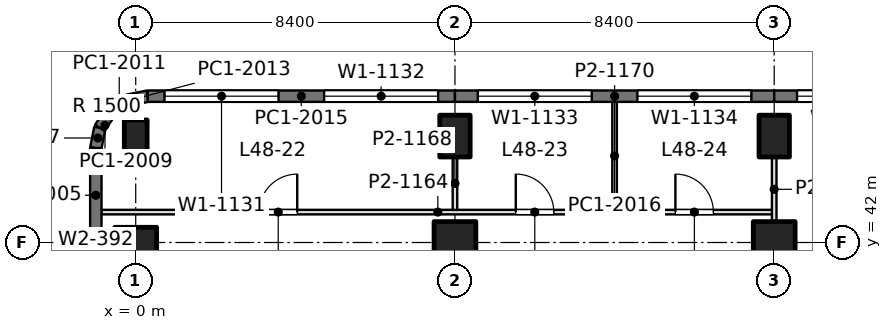
"""IFC4 building model, lengths in metres.
Left out: names, types, materials, properties, quantities, classifications, styles, units other than length and angle.
Written with IfcOpenShell. Run it as: python <this file> out.ifc"""

import sys

from ifc_helpers import new_model, si_unit, direction, frame, frame_2d, origin, origin_2d, place, context, subcontext, project, spatial, rectangle, extrude, element, fill, save


model = new_model("IFC4")
c1 = context("Model", 3, precision=1e-05, world=origin(), true_north=direction((0.0, 1.0)))
c2 = subcontext(c1, "Body", "Model", "MODEL_VIEW")
j1 = project(units=[si_unit("LENGTHUNIT", "METRE"), si_unit("PLANEANGLEUNIT", "RADIAN")], contexts=[c1])
p1 = place(None, origin())
s1 = spatial("IfcSite", under=j1, at=p1, CompositionType="ELEMENT")
p2 = place(p1, origin())
s2 = spatial("IfcBuilding", under=s1, at=p2, CompositionType="ELEMENT")
p3 = place(p2, frame((0.0, 0.0, 211.2)))
s3 = spatial("IfcBuildingStorey", under=s2, at=p3, CompositionType="ELEMENT", Elevation=211.2)
p4 = place(p3, frame((0.0, 42.0, 0.0), z_axis=(0.0, 0.0, 1.0), x_axis=(0.0, 1.0, 0.0)))
e1 = element("IfcColumn", 1, at=p4, inside=s3, PredefinedType="COLUMN", context=c2, shape_type="SweptSolid", body=[
    extrude(rectangle(XDim=0.8, YDim=1.1, at=origin_2d()), origin(), (0.0, 0.0, 1.0), 4.2),
])
p5 = place(p3, frame((0.0, 44.8, 0.0), z_axis=(0.0, 0.0, 1.0), x_axis=(1.0, 0.0, 0.0)))
e2 = element("IfcColumn", 2, at=p5, inside=s3, PredefinedType="COLUMN", context=c2, shape_type="SweptSolid", body=[
    extrude(rectangle(XDim=0.6, YDim=0.85, at=origin_2d()), origin(), (0.0, 0.0, 1.0), 4.2),
])
p6 = place(p3, frame((8.4, 42.0, 0.0), z_axis=(0.0, 0.0, 1.0), x_axis=(1.0, 0.0, 0.0)))
e3 = element("IfcColumn", 3, at=p6, inside=s3, PredefinedType="COLUMN", context=c2, shape_type="SweptSolid", body=[
    extrude(rectangle(XDim=1.1, YDim=1.1, at=origin_2d()), origin(), (0.0, 0.0, 1.0), 4.2),
])
p7 = place(p3, frame((8.4, 44.8, 0.0), z_axis=(0.0, 0.0, 1.0), x_axis=(1.0, 0.0, 0.0)))
e4 = element("IfcColumn", 4, at=p7, inside=s3, PredefinedType="COLUMN", context=c2, shape_type="SweptSolid", body=[
    extrude(rectangle(XDim=0.8, YDim=1.1, at=origin_2d()), origin(), (0.0, 0.0, 1.0), 4.2),
])
p8 = place(p3, frame((16.8, 42.0, 0.0), z_axis=(0.0, 0.0, 1.0), x_axis=(1.0, 0.0, 0.0)))
e5 = element("IfcColumn", 5, at=p8, inside=s3, PredefinedType="COLUMN", context=c2, shape_type="SweptSolid", body=[
    extrude(rectangle(XDim=1.1, YDim=1.1, at=origin_2d()), origin(), (0.0, 0.0, 1.0), 4.2),
])
p9 = place(p3, frame((16.8, 44.8, 0.0), z_axis=(0.0, 0.0, 1.0), x_axis=(1.0, 0.0, 0.0)))
e6 = element("IfcColumn", 6, at=p9, inside=s3, PredefinedType="COLUMN", context=c2, shape_type="SweptSolid", body=[
    extrude(rectangle(XDim=0.8, YDim=1.1, at=origin_2d()), origin(), (0.0, 0.0, 1.0), 4.2),
])
p10 = place(p3, frame((-1.05, 37.725, 0.0), z_axis=(0.0, 0.0, 1.0), x_axis=(0.0, 1.0, 0.0)))
e7 = element("IfcWall", 7, at=p10, inside=s3, PredefinedType="SOLIDWALL", context=c2, shape_type="SweptSolid", body=[
    extrude(rectangle(XDim=4.275, YDim=0.3, at=frame_2d((2.137, 0.0))), origin(), (0.0, 0.0, 1.0), 4.05),
])
p11 = place(p10, frame((0.938, 0.0, 0.9)))
e8 = element("IfcOpeningElement", 8, at=p11, cuts=e7, PredefinedType="OPENING", context=c2, shape_type="SweptSolid", body=[
    extrude(rectangle(XDim=2.4, YDim=1.9, at=frame_2d((1.2, 0.95))), frame((0.0, 0.16, 0.0), z_axis=(0.0, -1.0, 0.0), x_axis=(1.0, 0.0, 0.0)), (0.0, 0.0, 1.0), 0.32),
])
p12 = place(p3, frame((-1.05, 42.0, 0.0), z_axis=(0.0, 0.0, 1.0), x_axis=(0.0, 1.0, 0.0)))
e9 = element("IfcWall", 9, at=p12, inside=s3, PredefinedType="SOLIDWALL", context=c2, shape_type="SweptSolid", body=[
    extrude(rectangle(XDim=2.485, YDim=0.3, at=frame_2d((1.243, 0.0))), origin(), (0.0, 0.0, 1.0), 4.05),
])
p13 = place(p3, frame((-1.05, 44.485, 0.0), z_axis=(0.0, 0.0, 1.0), x_axis=(0.195073962632, 0.980788534345, 0.0)))
e10 = element("IfcWall", 10, at=p13, inside=s3, PredefinedType="SOLIDWALL", context=c2, shape_type="SweptSolid", body=[
    extrude(rectangle(XDim=0.541, YDim=0.3, at=frame_2d((0.271, 0.0))), origin(), (0.0, 0.0, 1.0), 4.05),
])
p14 = place(p3, frame((-0.945, 45.015, 0.0), z_axis=(0.0, 0.0, 1.0), x_axis=(0.55534295404, 0.831621430339, 0.0)))
e11 = element("IfcWall", 11, at=p14, inside=s3, PredefinedType="SOLIDWALL", context=c2, shape_type="SweptSolid", body=[
    extrude(rectangle(XDim=0.526, YDim=0.3, at=frame_2d((0.263, 0.0))), origin(), (0.0, 0.0, 1.0), 4.05),
])
p15 = place(p3, frame((-0.653, 45.453, 0.0), z_axis=(0.0, 0.0, 1.0), x_axis=(0.831692711774, 0.555236195849, 0.0)))
e12 = element("IfcWall", 12, at=p15, inside=s3, PredefinedType="SOLIDWALL", context=c2, shape_type="SweptSolid", body=[
    extrude(rectangle(XDim=0.525, YDim=0.3, at=frame_2d((0.263, 0.0))), origin(), (0.0, 0.0, 1.0), 4.05),
])
p16 = place(p3, frame((-0.216, 45.744, 0.0), z_axis=(0.0, 0.0, 1.0), x_axis=(0.980702050465, 0.1955082817, 0.0)))
e13 = element("IfcWall", 13, at=p16, inside=s3, PredefinedType="SOLIDWALL", context=c2, shape_type="SweptSolid", body=[
    extrude(rectangle(XDim=0.541, YDim=0.3, at=frame_2d((0.271, 0.0))), origin(), (0.0, 0.0, 1.0), 4.05),
])
p17 = place(p3, frame((0.315, 45.85, 0.0), z_axis=(0.0, 0.0, 1.0), x_axis=(1.0, 0.0, 0.0)))
e14 = element("IfcWall", 14, at=p17, inside=s3, PredefinedType="SOLIDWALL", context=c2, shape_type="SweptSolid", body=[
    extrude(rectangle(XDim=8.085, YDim=0.3, at=frame_2d((4.042, 0.0))), origin(), (0.0, 0.0, 1.0), 4.05),
])
p18 = place(p17, frame((0.443, 0.0, 0.9)))
e15 = element("IfcOpeningElement", 15, at=p18, cuts=e14, PredefinedType="OPENING", context=c2, shape_type="SweptSolid", body=[
    extrude(rectangle(XDim=3.0, YDim=1.9, at=frame_2d((1.5, 0.95))), frame((0.0, 0.16, 0.0), z_axis=(0.0, -1.0, 0.0), x_axis=(1.0, 0.0, 0.0)), (0.0, 0.0, 1.0), 0.32),
])
p19 = place(p17, frame((4.643, 0.0, 0.9)))
e16 = element("IfcOpeningElement", 16, at=p19, cuts=e14, PredefinedType="OPENING", context=c2, shape_type="SweptSolid", body=[
    extrude(rectangle(XDim=3.0, YDim=1.9, at=frame_2d((1.5, 0.95))), frame((0.0, 0.16, 0.0), z_axis=(0.0, -1.0, 0.0), x_axis=(1.0, 0.0, 0.0)), (0.0, 0.0, 1.0), 0.32),
])
p20 = place(p3, frame((8.4, 45.85, 0.0), z_axis=(0.0, 0.0, 1.0), x_axis=(1.0, 0.0, 0.0)))
e17 = element("IfcWall", 17, at=p20, inside=s3, PredefinedType="SOLIDWALL", context=c2, shape_type="SweptSolid", body=[
    extrude(rectangle(XDim=8.4, YDim=0.3, at=frame_2d((4.2, 0.0))), origin(), (0.0, 0.0, 1.0), 4.05),
])
p21 = place(p20, frame((0.6, 0.0, 0.9)))
e18 = element("IfcOpeningElement", 18, at=p21, cuts=e17, PredefinedType="OPENING", context=c2, shape_type="SweptSolid", body=[
    extrude(rectangle(XDim=3.0, YDim=1.9, at=frame_2d((1.5, 0.95))), frame((0.0, 0.16, 0.0), z_axis=(0.0, -1.0, 0.0), x_axis=(1.0, 0.0, 0.0)), (0.0, 0.0, 1.0), 0.32),
])
p22 = place(p20, frame((4.8, 0.0, 0.9)))
e19 = element("IfcOpeningElement", 19, at=p22, cuts=e17, PredefinedType="OPENING", context=c2, shape_type="SweptSolid", body=[
    extrude(rectangle(XDim=3.0, YDim=1.9, at=frame_2d((1.5, 0.95))), frame((0.0, 0.16, 0.0), z_axis=(0.0, -1.0, 0.0), x_axis=(1.0, 0.0, 0.0)), (0.0, 0.0, 1.0), 0.32),
])
p23 = place(p3, frame((16.8, 45.85, 0.0), z_axis=(0.0, 0.0, 1.0), x_axis=(1.0, 0.0, 0.0)))
e20 = element("IfcWall", 20, at=p23, inside=s3, PredefinedType="SOLIDWALL", context=c2, shape_type="SweptSolid", body=[
    extrude(rectangle(XDim=8.4, YDim=0.3, at=frame_2d((4.2, 0.0))), origin(), (0.0, 0.0, 1.0), 4.05),
])
p24 = place(p23, frame((0.6, 0.0, 0.9)))
e21 = element("IfcOpeningElement", 21, at=p24, cuts=e20, PredefinedType="OPENING", context=c2, shape_type="SweptSolid", body=[
    extrude(rectangle(XDim=3.0, YDim=1.9, at=frame_2d((1.5, 0.95))), frame((0.0, 0.16, 0.0), z_axis=(0.0, -1.0, 0.0), x_axis=(1.0, 0.0, 0.0)), (0.0, 0.0, 1.0), 0.32),
])
p25 = place(p23, frame((4.8, 0.0, 0.9)))
e22 = element("IfcOpeningElement", 22, at=p25, cuts=e20, PredefinedType="OPENING", context=c2, shape_type="SweptSolid", body=[
    extrude(rectangle(XDim=3.0, YDim=1.9, at=frame_2d((1.5, 0.95))), frame((0.0, 0.16, 0.0), z_axis=(0.0, -1.0, 0.0), x_axis=(1.0, 0.0, 0.0)), (0.0, 0.0, 1.0), 0.32),
])
p26 = place(p3, frame((-0.902, 42.8, 0.0), z_axis=(0.0, 0.0, 1.0), x_axis=(1.0, 0.0, 0.0)))
e23 = element("IfcWall", 23, at=p26, inside=s3, PredefinedType="PARTITIONING", context=c2, shape_type="SweptSolid", body=[
    extrude(rectangle(XDim=17.702, YDim=0.12, at=frame_2d((8.851, 0.0))), origin(), (0.0, 0.0, 1.0), 3.56),
])
p27 = place(p26, frame((4.152, 0.0, 0.0)))
e24 = element("IfcOpeningElement", 24, at=p27, cuts=e23, PredefinedType="OPENING", context=c2, shape_type="SweptSolid", body=[
    extrude(rectangle(XDim=1.0, YDim=2.4, at=frame_2d((0.5, 1.2))), frame((0.0, 0.07, 0.0), z_axis=(0.0, -1.0, 0.0), x_axis=(1.0, 0.0, 0.0)), (0.0, 0.0, 1.0), 0.14),
])
p28 = place(p26, frame((10.902, 0.0, 0.0)))
e25 = element("IfcOpeningElement", 25, at=p28, cuts=e23, PredefinedType="OPENING", context=c2, shape_type="SweptSolid", body=[
    extrude(rectangle(XDim=1.0, YDim=2.4, at=frame_2d((0.5, 1.2))), frame((0.0, 0.07, 0.0), z_axis=(0.0, -1.0, 0.0), x_axis=(1.0, 0.0, 0.0)), (0.0, 0.0, 1.0), 0.14),
])
p29 = place(p26, frame((15.102, 0.0, 0.0)))
e26 = element("IfcOpeningElement", 26, at=p29, cuts=e23, PredefinedType="OPENING", context=c2, shape_type="SweptSolid", body=[
    extrude(rectangle(XDim=1.0, YDim=2.4, at=frame_2d((0.5, 1.2))), frame((0.0, 0.07, 0.0), z_axis=(0.0, -1.0, 0.0), x_axis=(1.0, 0.0, 0.0)), (0.0, 0.0, 1.0), 0.14),
])
p30 = place(p3, frame((8.4, 42.858, 0.0), z_axis=(0.0, 0.0, 1.0), x_axis=(0.0, 1.0, 0.0)))
e27 = element("IfcWall", 27, at=p30, inside=s3, PredefinedType="PARTITIONING", context=c2, shape_type="SweptSolid", body=[
    extrude(rectangle(XDim=1.393, YDim=0.12, at=frame_2d((0.697, 0.0))), origin(), (0.0, 0.0, 1.0), 3.69),
])
p31 = place(p3, frame((12.6, 42.858, 0.0), z_axis=(0.0, 0.0, 1.0), x_axis=(0.0, 1.0, 0.0)))
e28 = element("IfcWall", 28, at=p31, inside=s3, PredefinedType="PARTITIONING", context=c2, shape_type="SweptSolid", body=[
    extrude(rectangle(XDim=2.844, YDim=0.12, at=frame_2d((1.422, 0.0))), origin(), (0.0, 0.0, 1.0), 3.56),
])
p32 = place(p3, frame((16.8, 42.548, 0.0), z_axis=(0.0, 0.0, 1.0), x_axis=(0.0, 1.0, 0.0)))
e29 = element("IfcWall", 29, at=p32, inside=s3, PredefinedType="PARTITIONING", context=c2, shape_type="SweptSolid", body=[
    extrude(rectangle(XDim=1.703, YDim=0.12, at=frame_2d((0.852, 0.0))), origin(), (0.0, 0.0, 1.0), 3.69),
])
p33 = place(p18, origin())
e30 = element("IfcWindow", 30, at=p33, inside=s3, PartitioningType="SINGLE_PANEL", PredefinedType="WINDOW", context=c2, shape_type="SweptSolid", body=[
    extrude(rectangle(XDim=3.0, YDim=1.9, at=frame_2d((1.5, 0.95))), frame((0.0, 0.03, 0.0), z_axis=(0.0, -1.0, 0.0), x_axis=(1.0, 0.0, 0.0)), (0.0, 0.0, 1.0), 0.06),
])
fill(e15, e30)
p34 = place(p19, origin())
e31 = element("IfcWindow", 31, at=p34, inside=s3, PartitioningType="SINGLE_PANEL", PredefinedType="WINDOW", context=c2, shape_type="SweptSolid", body=[
    extrude(rectangle(XDim=3.0, YDim=1.9, at=frame_2d((1.5, 0.95))), frame((0.0, 0.03, 0.0), z_axis=(0.0, -1.0, 0.0), x_axis=(1.0, 0.0, 0.0)), (0.0, 0.0, 1.0), 0.06),
])
fill(e16, e31)
p35 = place(p21, origin())
e32 = element("IfcWindow", 32, at=p35, inside=s3, PartitioningType="SINGLE_PANEL", PredefinedType="WINDOW", context=c2, shape_type="SweptSolid", body=[
    extrude(rectangle(XDim=3.0, YDim=1.9, at=frame_2d((1.5, 0.95))), frame((0.0, 0.03, 0.0), z_axis=(0.0, -1.0, 0.0), x_axis=(1.0, 0.0, 0.0)), (0.0, 0.0, 1.0), 0.06),
])
fill(e18, e32)
p36 = place(p22, origin())
e33 = element("IfcWindow", 33, at=p36, inside=s3, PartitioningType="SINGLE_PANEL", PredefinedType="WINDOW", context=c2, shape_type="SweptSolid", body=[
    extrude(rectangle(XDim=3.0, YDim=1.9, at=frame_2d((1.5, 0.95))), frame((0.0, 0.03, 0.0), z_axis=(0.0, -1.0, 0.0), x_axis=(1.0, 0.0, 0.0)), (0.0, 0.0, 1.0), 0.06),
])
fill(e19, e33)
p37 = place(p24, origin())
e34 = element("IfcWindow", 34, at=p37, inside=s3, PartitioningType="SINGLE_PANEL", PredefinedType="WINDOW", context=c2, shape_type="SweptSolid", body=[
    extrude(rectangle(XDim=3.0, YDim=1.9, at=frame_2d((1.5, 0.95))), frame((0.0, 0.03, 0.0), z_axis=(0.0, -1.0, 0.0), x_axis=(1.0, 0.0, 0.0)), (0.0, 0.0, 1.0), 0.06),
])
fill(e21, e34)
p38 = place(p27, origin())
e35 = element("IfcDoor", 35, at=p38, inside=s3, OperationType="SINGLE_SWING_RIGHT", PredefinedType="DOOR", context=c2, shape_type="SweptSolid", body=[
    extrude(rectangle(XDim=1.0, YDim=2.4, at=frame_2d((0.5, 1.2))), frame((0.0, 0.025, 0.0), z_axis=(0.0, -1.0, 0.0), x_axis=(1.0, 0.0, 0.0)), (0.0, 0.0, 1.0), 0.05),
])
fill(e24, e35)
p39 = place(p28, origin())
e36 = element("IfcDoor", 36, at=p39, inside=s3, OperationType="SINGLE_SWING_LEFT", PredefinedType="DOOR", context=c2, shape_type="SweptSolid", body=[
    extrude(rectangle(XDim=1.0, YDim=2.4, at=frame_2d((0.5, 1.2))), frame((0.0, 0.025, 0.0), z_axis=(0.0, -1.0, 0.0), x_axis=(1.0, 0.0, 0.0)), (0.0, 0.0, 1.0), 0.05),
])
fill(e25, e36)
p40 = place(p29, origin())
e37 = element("IfcDoor", 37, at=p40, inside=s3, OperationType="SINGLE_SWING_LEFT", PredefinedType="DOOR", context=c2, shape_type="SweptSolid", body=[
    extrude(rectangle(XDim=1.0, YDim=2.4, at=frame_2d((0.5, 1.2))), frame((0.0, 0.025, 0.0), z_axis=(0.0, -1.0, 0.0), x_axis=(1.0, 0.0, 0.0)), (0.0, 0.0, 1.0), 0.05),
])
fill(e26, e37)
save(model, sys.argv[1])
